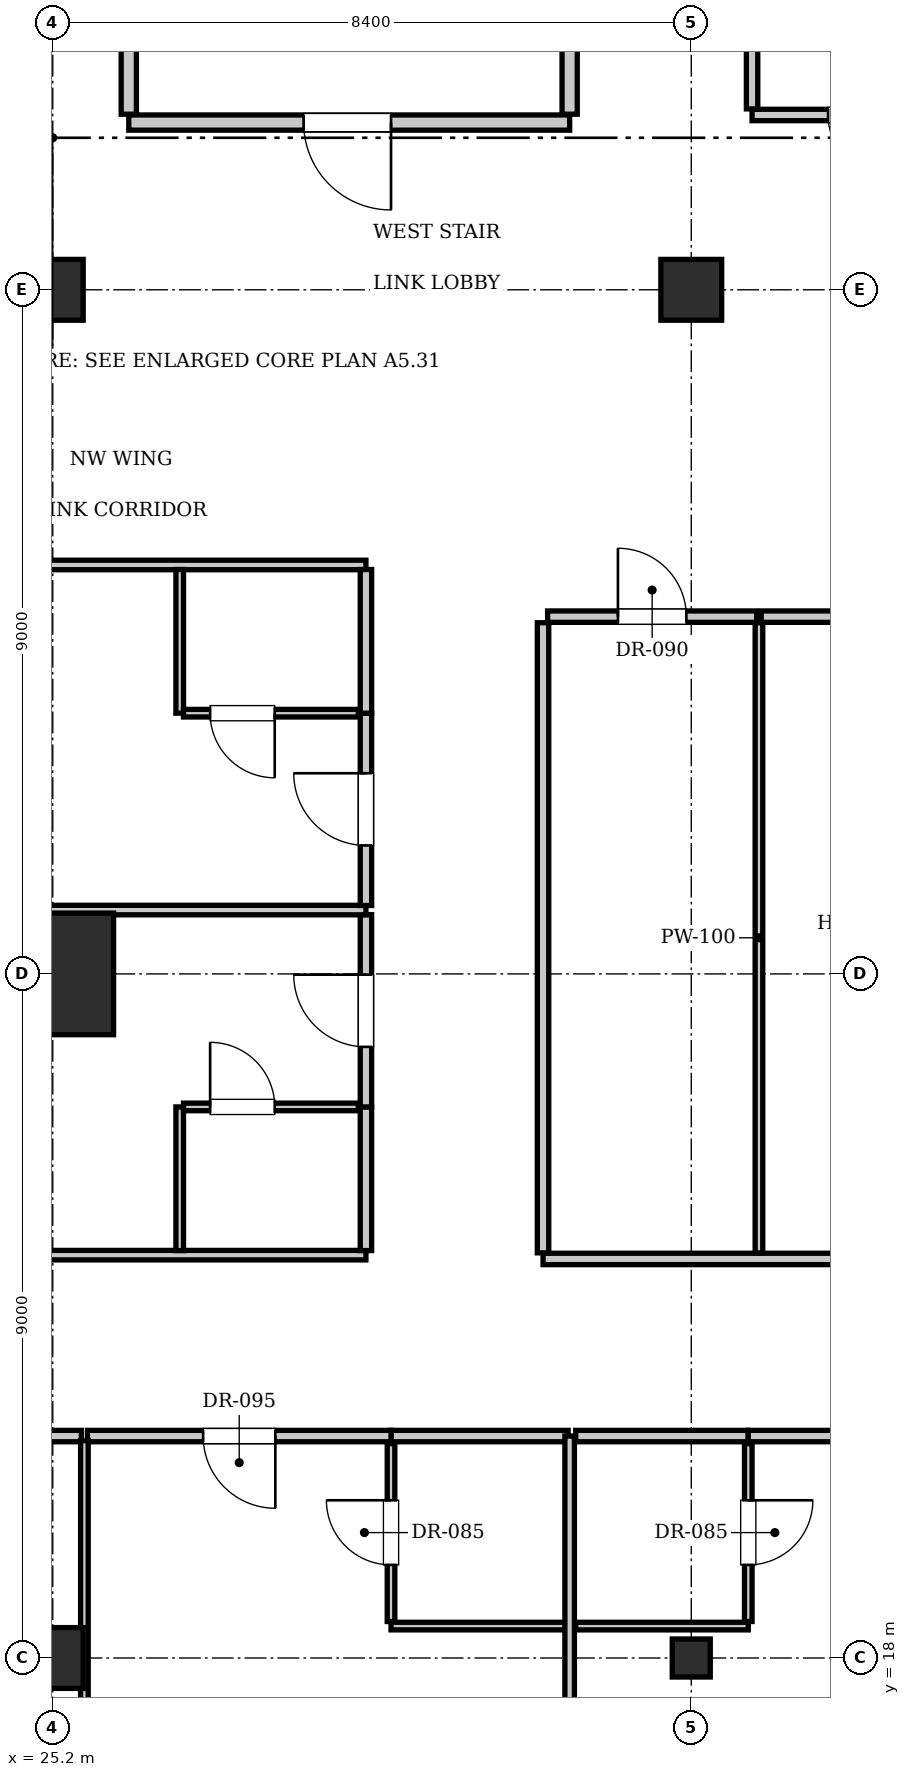
"""IFC4 building model, lengths in metres.
Left out: names, types, materials, properties, quantities, classifications, styles, units other than length and angle.
Written with IfcOpenShell. Run it as: python <this file> out.ifc"""

import sys

from ifc_helpers import new_model, si_unit, direction, frame, frame_2d, origin, origin_2d, place, context, subcontext, project, spatial, rectangle, i_section, extrude, element, fill, save


model = new_model("IFC4")
c1 = context("Model", 3, precision=1e-05, world=origin(), true_north=direction((0.0, 1.0)))
c2 = subcontext(c1, "Body", "Model", "MODEL_VIEW")
j1 = project(units=[si_unit("LENGTHUNIT", "METRE"), si_unit("PLANEANGLEUNIT", "RADIAN")], contexts=[c1])
p1 = place(None, origin())
s1 = spatial("IfcSite", under=j1, at=p1, CompositionType="ELEMENT")
p2 = place(p1, origin())
s2 = spatial("IfcBuilding", under=s1, at=p2, CompositionType="ELEMENT")
p3 = place(p2, frame((0.0, 0.0, 301.0)))
s3 = spatial("IfcBuildingStorey", under=s2, at=p3, CompositionType="ELEMENT", Elevation=301.0)
p4 = place(p3, frame((25.2, 27.0, 0.0), z_axis=(0.0, 0.0, 1.0), x_axis=(1.0, 0.0, 0.0)))
e1 = element("IfcColumn", 1, at=p4, inside=s3, PredefinedType="COLUMN", context=c2, shape_type="SweptSolid", body=[
    extrude(rectangle(XDim=1.6, YDim=1.6, at=origin_2d()), origin(), (0.0, 0.0, 1.0), 3.85),
])
for number, where, z_axis, x_axis in (
    (2, (25.2, 36.0, 0.0), (0.0, 0.0, 1.0), (1.0, 0.0, 0.0)),
    (3, (33.6, 36.0, 0.0), (0.0, 0.0, 1.0), (1.0, 0.0, 0.0)),
    (4, (25.2, 18.0, 0.0), (0.0, 0.0, 1.0), (1.0, 0.0, 0.0)),
):
    element("IfcColumn", number, at=place(p3, frame(where, z_axis=z_axis, x_axis=x_axis)), inside=s3, PredefinedType="COLUMN", context=c2, shape_type="SweptSolid", body=[
        extrude(rectangle(XDim=0.8, YDim=0.8, at=origin_2d()), origin(), (0.0, 0.0, 1.0), 3.85),
    ])
p5 = place(p3, frame((33.6, 18.0, 0.0), z_axis=(0.0, 0.0, 1.0), x_axis=(1.0, 0.0, 0.0)))
e5 = element("IfcColumn", 5, at=p5, inside=s3, PredefinedType="COLUMN", context=c2, shape_type="SweptSolid", body=[
    extrude(i_section(OverallWidth=0.5, OverallDepth=0.5, WebThickness=0.022, FlangeThickness=0.032, at=origin_2d()), origin(), (0.0, 0.0, 1.0), 3.85),
])
p6 = place(p3, frame((26.2, 38.2, 0.0), z_axis=(0.0, 0.0, 1.0), x_axis=(1.0, 0.0, 0.0)))
e6 = element("IfcWall", 6, at=p6, inside=s3, PredefinedType="PARTITIONING", context=c2, shape_type="SweptSolid", body=[
    extrude(rectangle(XDim=5.8, YDim=0.2, at=frame_2d((2.9, 0.0))), origin(), (0.0, 0.0, 1.0), 3.61),
])
p7 = place(p6, frame((2.3, 0.0, 0.0)))
e7 = element("IfcOpeningElement", 7, at=p7, cuts=e6, PredefinedType="OPENING", context=c2, shape_type="SweptSolid", body=[
    extrude(rectangle(XDim=1.15, YDim=2.15, at=frame_2d((0.575, 1.075))), frame((0.0, 0.11, 0.0), z_axis=(0.0, -1.0, 0.0), x_axis=(1.0, 0.0, 0.0)), (0.0, 0.0, 1.0), 0.22),
])
for number, where, z_axis, x_axis in (
    (8, (26.2, 38.31, 0.0), (0.0, 0.0, 1.0), (0.0, 1.0, 0.0)),
    (9, (32.0, 38.31, 0.0), (0.0, 0.0, 1.0), (0.0, 1.0, 0.0)),
):
    element("IfcWall", number, at=place(p3, frame(where, z_axis=z_axis, x_axis=x_axis)), inside=s3, PredefinedType="PARTITIONING", context=c2, shape_type="SweptSolid", body=[
        extrude(rectangle(XDim=3.07, YDim=0.2, at=frame_2d((1.535, 0.0))), origin(), (0.0, 0.0, 1.0), 3.61),
    ])
p8 = place(p3, frame((34.4, 38.3, 0.0), z_axis=(0.0, 0.0, 1.0), x_axis=(1.0, 0.0, 0.0)))
e10 = element("IfcWall", 10, at=p8, inside=s3, PredefinedType="PARTITIONING", context=c2, shape_type="SweptSolid", body=[
    extrude(rectangle(XDim=2.88, YDim=0.15, at=frame_2d((1.44, 0.0))), origin(), (0.0, 0.0, 1.0), 3.61),
])
p9 = place(p8, frame((1.0, 0.0, 0.0)))
e11 = element("IfcOpeningElement", 11, at=p9, cuts=e10, PredefinedType="OPENING", context=c2, shape_type="SweptSolid", body=[
    extrude(rectangle(XDim=0.8, YDim=2.05, at=frame_2d((0.4, 1.025))), frame((0.0, 0.085, 0.0), z_axis=(0.0, -1.0, 0.0), x_axis=(1.0, 0.0, 0.0)), (0.0, 0.0, 1.0), 0.17),
])
p10 = place(p3, frame((34.4, 38.38, 0.0), z_axis=(0.0, 0.0, 1.0), x_axis=(0.0, 1.0, 0.0)))
e12 = element("IfcWall", 12, at=p10, inside=s3, PredefinedType="PARTITIONING", context=c2, shape_type="SweptSolid", body=[
    extrude(rectangle(XDim=2.84, YDim=0.15, at=frame_2d((1.42, 0.0))), origin(), (0.0, 0.0, 1.0), 3.61),
])
p11 = place(p3, frame((31.65, 23.25, 0.0), z_axis=(0.0, 0.0, 1.0), x_axis=(1.0, 0.0, 0.0)))
e13 = element("IfcWall", 13, at=p11, inside=s3, PredefinedType="PARTITIONING", context=c2, shape_type="SweptSolid", body=[
    extrude(rectangle(XDim=12.35, YDim=0.15, at=frame_2d((6.175, 0.0))), origin(), (0.0, 0.0, 1.0), 3.61),
])
p12 = place(p3, frame((31.65, 23.33, 0.0), z_axis=(0.0, 0.0, 1.0), x_axis=(0.0, 1.0, 0.0)))
e14 = element("IfcWall", 14, at=p12, inside=s3, PredefinedType="PARTITIONING", context=c2, shape_type="SweptSolid", body=[
    extrude(rectangle(XDim=8.29, YDim=0.15, at=frame_2d((4.145, 0.0))), origin(), (0.0, 0.0, 1.0), 3.61),
])
p13 = place(p3, frame((31.71, 31.7, 0.0), z_axis=(0.0, 0.0, 1.0), x_axis=(1.0, 0.0, 0.0)))
e15 = element("IfcWall", 15, at=p13, inside=s3, PredefinedType="PARTITIONING", context=c2, shape_type="SweptSolid", body=[
    extrude(rectangle(XDim=2.75, YDim=0.15, at=frame_2d((1.375, 0.0))), origin(), (0.0, 0.0, 1.0), 3.61),
])
p14 = place(p13, frame((0.925, 0.0, 0.0)))
e16 = element("IfcOpeningElement", 16, at=p14, cuts=e15, PredefinedType="OPENING", context=c2, shape_type="SweptSolid", body=[
    extrude(rectangle(XDim=0.9, YDim=2.1, at=frame_2d((0.45, 1.05))), frame((0.0, 0.085, 0.0), z_axis=(0.0, -1.0, 0.0), x_axis=(1.0, 0.0, 0.0)), (0.0, 0.0, 1.0), 0.17),
])
p15 = place(p3, frame((34.49, 23.33, 0.0), z_axis=(0.0, 0.0, 1.0), x_axis=(0.0, 1.0, 0.0)))
e17 = element("IfcWall", 17, at=p15, inside=s3, PredefinedType="PARTITIONING", context=c2, shape_type="SweptSolid", body=[
    extrude(rectangle(XDim=8.29, YDim=0.1, at=frame_2d((4.145, 0.0))), origin(), (0.0, 0.0, 1.0), 3.61),
])
p16 = place(p3, frame((34.521, 31.7, 0.0), z_axis=(0.0, 0.0, 1.0), x_axis=(1.0, 0.0, 0.0)))
e18 = element("IfcWall", 18, at=p16, inside=s3, PredefinedType="PARTITIONING", context=c2, shape_type="SweptSolid", body=[
    extrude(rectangle(XDim=4.139, YDim=0.15, at=frame_2d((2.069, 0.0))), origin(), (0.0, 0.0, 1.0), 3.61),
])
p17 = place(p16, frame((1.619, 0.0, 0.0)))
e19 = element("IfcOpeningElement", 19, at=p17, cuts=e18, PredefinedType="OPENING", context=c2, shape_type="SweptSolid", body=[
    extrude(rectangle(XDim=0.9, YDim=2.1, at=frame_2d((0.45, 1.05))), frame((0.0, 0.085, 0.0), z_axis=(0.0, -1.0, 0.0), x_axis=(1.0, 0.0, 0.0)), (0.0, 0.0, 1.0), 0.17),
])
p18 = place(p3, frame((29.65, 20.92, 0.0), z_axis=(0.0, 0.0, 1.0), x_axis=(1.0, 0.0, 0.0)))
e20 = element("IfcWall", 20, at=p18, inside=s3, PredefinedType="PARTITIONING", context=c2, shape_type="SweptSolid", body=[
    extrude(rectangle(XDim=2.33, YDim=0.15, at=frame_2d((1.165, 0.0))), origin(), (0.0, 0.0, 1.0), 3.61),
])
p19 = place(p3, frame((29.65, 18.42, 0.0), z_axis=(0.0, 0.0, 1.0), x_axis=(1.0, 0.0, 0.0)))
e21 = element("IfcWall", 21, at=p19, inside=s3, PredefinedType="PARTITIONING", context=c2, shape_type="SweptSolid", body=[
    extrude(rectangle(XDim=2.31, YDim=0.1, at=frame_2d((1.155, 0.0))), origin(), (0.0, 0.0, 1.0), 3.61),
])
p20 = place(p3, frame((29.65, 18.48, 0.0), z_axis=(0.0, 0.0, 1.0), x_axis=(0.0, 1.0, 0.0)))
e22 = element("IfcWall", 22, at=p20, inside=s3, PredefinedType="PARTITIONING", context=c2, shape_type="SweptSolid", body=[
    extrude(rectangle(XDim=2.34, YDim=0.1, at=frame_2d((1.17, 0.0))), origin(), (0.0, 0.0, 1.0), 3.61),
])
p21 = place(p20, frame((0.745, 0.0, 0.0)))
e23 = element("IfcOpeningElement", 23, at=p21, cuts=e22, PredefinedType="OPENING", context=c2, shape_type="SweptSolid", body=[
    extrude(rectangle(XDim=0.85, YDim=2.1, at=frame_2d((0.425, 1.05))), frame((0.0, 0.06, 0.0), z_axis=(0.0, -1.0, 0.0), x_axis=(1.0, 0.0, 0.0)), (0.0, 0.0, 1.0), 0.12),
])
p22 = place(p3, frame((20.62, 20.92, 0.0), z_axis=(0.0, 0.0, 1.0), x_axis=(1.0, 0.0, 0.0)))
e24 = element("IfcWall", 24, at=p22, inside=s3, PredefinedType="PARTITIONING", context=c2, shape_type="SweptSolid", body=[
    extrude(rectangle(XDim=4.956, YDim=0.15, at=frame_2d((2.478, 0.0))), origin(), (0.0, 0.0, 1.0), 3.61),
])
p23 = place(p3, frame((25.656, 20.92, 0.0), z_axis=(0.0, 0.0, 1.0), x_axis=(1.0, 0.0, 0.0)))
e25 = element("IfcWall", 25, at=p23, inside=s3, PredefinedType="PARTITIONING", context=c2, shape_type="SweptSolid", body=[
    extrude(rectangle(XDim=3.994, YDim=0.15, at=frame_2d((1.997, 0.0))), origin(), (0.0, 0.0, 1.0), 3.61),
])
p24 = place(p23, frame((1.522, 0.0, 0.0)))
e26 = element("IfcOpeningElement", 26, at=p24, cuts=e25, PredefinedType="OPENING", context=c2, shape_type="SweptSolid", body=[
    extrude(rectangle(XDim=0.95, YDim=2.15, at=frame_2d((0.475, 1.075))), frame((0.0, 0.085, 0.0), z_axis=(0.0, -1.0, 0.0), x_axis=(1.0, 0.0, 0.0)), (0.0, 0.0, 1.0), 0.17),
])
p25 = place(p3, frame((25.616, 9.23, 0.0), z_axis=(0.0, 0.0, 1.0), x_axis=(0.0, 1.0, 0.0)))
e27 = element("IfcWall", 27, at=p25, inside=s3, PredefinedType="PARTITIONING", context=c2, shape_type="SweptSolid", body=[
    extrude(rectangle(XDim=11.63, YDim=0.1, at=frame_2d((5.815, 0.0))), origin(), (0.0, 0.0, 1.0), 3.61),
])
p26 = place(p25, frame((1.6, 0.0, 0.0)))
e28 = element("IfcOpeningElement", 28, at=p26, cuts=e27, PredefinedType="OPENING", context=c2, shape_type="SweptSolid", body=[
    extrude(rectangle(XDim=0.9, YDim=2.1, at=frame_2d((0.45, 1.05))), frame((0.0, 0.06, 0.0), z_axis=(0.0, -1.0, 0.0), x_axis=(1.0, 0.0, 0.0)), (0.0, 0.0, 1.0), 0.12),
])
p27 = place(p3, frame((32.0, 9.3, 0.0), z_axis=(0.0, 0.0, 1.0), x_axis=(0.0, 1.0, 0.0)))
e29 = element("IfcWall", 29, at=p27, inside=s3, PredefinedType="PARTITIONING", context=c2, shape_type="SweptSolid", body=[
    extrude(rectangle(XDim=11.62, YDim=0.125, at=frame_2d((5.81, 0.0))), origin(), (0.0, 0.0, 1.0), 3.61),
])
p28 = place(p3, frame((32.08, 20.92, 0.0), z_axis=(0.0, 0.0, 1.0), x_axis=(1.0, 0.0, 0.0)))
e30 = element("IfcWall", 30, at=p28, inside=s3, PredefinedType="PARTITIONING", context=c2, shape_type="SweptSolid", body=[
    extrude(rectangle(XDim=2.27, YDim=0.15, at=frame_2d((1.135, 0.0))), origin(), (0.0, 0.0, 1.0), 3.61),
])
p29 = place(p3, frame((32.08, 18.42, 0.0), z_axis=(0.0, 0.0, 1.0), x_axis=(1.0, 0.0, 0.0)))
e31 = element("IfcWall", 31, at=p29, inside=s3, PredefinedType="PARTITIONING", context=c2, shape_type="SweptSolid", body=[
    extrude(rectangle(XDim=2.27, YDim=0.1, at=frame_2d((1.135, 0.0))), origin(), (0.0, 0.0, 1.0), 3.61),
])
p30 = place(p3, frame((34.35, 18.48, 0.0), z_axis=(0.0, 0.0, 1.0), x_axis=(0.0, 1.0, 0.0)))
e32 = element("IfcWall", 32, at=p30, inside=s3, PredefinedType="PARTITIONING", context=c2, shape_type="SweptSolid", body=[
    extrude(rectangle(XDim=2.34, YDim=0.1, at=frame_2d((1.17, 0.0))), origin(), (0.0, 0.0, 1.0), 3.61),
])
p31 = place(p30, frame((0.745, 0.0, 0.0)))
e33 = element("IfcOpeningElement", 33, at=p31, cuts=e32, PredefinedType="OPENING", context=c2, shape_type="SweptSolid", body=[
    extrude(rectangle(XDim=0.85, YDim=2.1, at=frame_2d((0.425, 1.05))), frame((0.0, 0.06, 0.0), z_axis=(0.0, -1.0, 0.0), x_axis=(1.0, 0.0, 0.0)), (0.0, 0.0, 1.0), 0.12),
])
p32 = place(p3, frame((34.35, 20.92, 0.0), z_axis=(0.0, 0.0, 1.0), x_axis=(1.0, 0.0, 0.0)))
e34 = element("IfcWall", 34, at=p32, inside=s3, PredefinedType="PARTITIONING", context=c2, shape_type="SweptSolid", body=[
    extrude(rectangle(XDim=4.106, YDim=0.15, at=frame_2d((2.053, 0.0))), origin(), (0.0, 0.0, 1.0), 3.61),
])
p33 = place(p32, frame((1.578, 0.0, 0.0)))
e35 = element("IfcOpeningElement", 35, at=p33, cuts=e34, PredefinedType="OPENING", context=c2, shape_type="SweptSolid", body=[
    extrude(rectangle(XDim=0.95, YDim=2.15, at=frame_2d((0.475, 1.075))), frame((0.0, 0.085, 0.0), z_axis=(0.0, -1.0, 0.0), x_axis=(1.0, 0.0, 0.0)), (0.0, 0.0, 1.0), 0.17),
])
for number, where, z_axis, x_axis in (
    (36, (15.5, 23.3, 0.0), (0.0, 0.0, 1.0), (1.0, 0.0, 0.0)),
    (37, (15.5, 32.38, 0.0), (0.0, 0.0, 1.0), (1.0, 0.0, 0.0)),
):
    element("IfcWall", number, at=place(p3, frame(where, z_axis=z_axis, x_axis=x_axis)), inside=s3, PredefinedType="PARTITIONING", context=c2, shape_type="SweptSolid", body=[
        extrude(rectangle(XDim=13.82, YDim=0.125, at=frame_2d((6.91, 0.0))), origin(), (0.0, 0.0, 1.0), 3.61),
    ])
p34 = place(p3, frame((29.32, 23.36, 0.0), z_axis=(0.0, 0.0, 1.0), x_axis=(0.0, 1.0, 0.0)))
e38 = element("IfcWall", 38, at=p34, inside=s3, PredefinedType="PARTITIONING", context=c2, shape_type="SweptSolid", body=[
    extrude(rectangle(XDim=1.89, YDim=0.15, at=frame_2d((0.945, 0.0))), origin(), (0.0, 0.0, 1.0), 3.61),
])
p35 = place(p3, frame((29.32, 25.25, 0.0), z_axis=(0.0, 0.0, 1.0), x_axis=(0.0, 1.0, 0.0)))
e39 = element("IfcWall", 39, at=p35, inside=s3, PredefinedType="PARTITIONING", context=c2, shape_type="SweptSolid", body=[
    extrude(rectangle(XDim=2.53, YDim=0.15, at=frame_2d((1.265, 0.0))), origin(), (0.0, 0.0, 1.0), 3.61),
])
p36 = place(p35, frame((0.79, 0.0, 0.0)))
e40 = element("IfcOpeningElement", 40, at=p36, cuts=e39, PredefinedType="OPENING", context=c2, shape_type="SweptSolid", body=[
    extrude(rectangle(XDim=0.95, YDim=2.15, at=frame_2d((0.475, 1.075))), frame((0.0, 0.085, 0.0), z_axis=(0.0, -1.0, 0.0), x_axis=(1.0, 0.0, 0.0)), (0.0, 0.0, 1.0), 0.17),
])
p37 = place(p3, frame((26.87, 23.36, 0.0), z_axis=(0.0, 0.0, 1.0), x_axis=(0.0, 1.0, 0.0)))
e41 = element("IfcWall", 41, at=p37, inside=s3, PredefinedType="PARTITIONING", context=c2, shape_type="SweptSolid", body=[
    extrude(rectangle(XDim=1.89, YDim=0.1, at=frame_2d((0.945, 0.0))), origin(), (0.0, 0.0, 1.0), 3.61),
])
p38 = place(p3, frame((26.92, 25.25, 0.0), z_axis=(0.0, 0.0, 1.0), x_axis=(1.0, 0.0, 0.0)))
e42 = element("IfcWall", 42, at=p38, inside=s3, PredefinedType="PARTITIONING", context=c2, shape_type="SweptSolid", body=[
    extrude(rectangle(XDim=2.3, YDim=0.1, at=frame_2d((1.15, 0.0))), origin(), (0.0, 0.0, 1.0), 3.61),
])
p39 = place(p38, frame((0.35, 0.0, 0.0)))
e43 = element("IfcOpeningElement", 43, at=p39, cuts=e42, PredefinedType="OPENING", context=c2, shape_type="SweptSolid", body=[
    extrude(rectangle(XDim=0.85, YDim=2.1, at=frame_2d((0.425, 1.05))), frame((0.0, 0.06, 0.0), z_axis=(0.0, -1.0, 0.0), x_axis=(1.0, 0.0, 0.0)), (0.0, 0.0, 1.0), 0.12),
])
p40 = place(p3, frame((15.5, 27.84, 0.0), z_axis=(0.0, 0.0, 1.0), x_axis=(1.0, 0.0, 0.0)))
e44 = element("IfcWall", 44, at=p40, inside=s3, PredefinedType="PARTITIONING", context=c2, shape_type="SweptSolid", body=[
    extrude(rectangle(XDim=13.82, YDim=0.125, at=frame_2d((6.91, 0.0))), origin(), (0.0, 0.0, 1.0), 3.61),
])
p41 = place(p3, frame((29.32, 27.9, 0.0), z_axis=(0.0, 0.0, 1.0), x_axis=(0.0, 1.0, 0.0)))
e45 = element("IfcWall", 45, at=p41, inside=s3, PredefinedType="PARTITIONING", context=c2, shape_type="SweptSolid", body=[
    extrude(rectangle(XDim=2.53, YDim=0.15, at=frame_2d((1.265, 0.0))), origin(), (0.0, 0.0, 1.0), 3.61),
])
p42 = place(p41, frame((0.79, 0.0, 0.0)))
e46 = element("IfcOpeningElement", 46, at=p42, cuts=e45, PredefinedType="OPENING", context=c2, shape_type="SweptSolid", body=[
    extrude(rectangle(XDim=0.95, YDim=2.15, at=frame_2d((0.475, 1.075))), frame((0.0, 0.085, 0.0), z_axis=(0.0, -1.0, 0.0), x_axis=(1.0, 0.0, 0.0)), (0.0, 0.0, 1.0), 0.17),
])
p43 = place(p3, frame((29.32, 30.43, 0.0), z_axis=(0.0, 0.0, 1.0), x_axis=(0.0, 1.0, 0.0)))
e47 = element("IfcWall", 47, at=p43, inside=s3, PredefinedType="PARTITIONING", context=c2, shape_type="SweptSolid", body=[
    extrude(rectangle(XDim=1.89, YDim=0.15, at=frame_2d((0.945, 0.0))), origin(), (0.0, 0.0, 1.0), 3.61),
])
p44 = place(p3, frame((26.87, 30.43, 0.0), z_axis=(0.0, 0.0, 1.0), x_axis=(0.0, 1.0, 0.0)))
e48 = element("IfcWall", 48, at=p44, inside=s3, PredefinedType="PARTITIONING", context=c2, shape_type="SweptSolid", body=[
    extrude(rectangle(XDim=1.89, YDim=0.1, at=frame_2d((0.945, 0.0))), origin(), (0.0, 0.0, 1.0), 3.61),
])
p45 = place(p3, frame((26.92, 30.43, 0.0), z_axis=(0.0, 0.0, 1.0), x_axis=(1.0, 0.0, 0.0)))
e49 = element("IfcWall", 49, at=p45, inside=s3, PredefinedType="PARTITIONING", context=c2, shape_type="SweptSolid", body=[
    extrude(rectangle(XDim=2.3, YDim=0.1, at=frame_2d((1.15, 0.0))), origin(), (0.0, 0.0, 1.0), 3.61),
])
p46 = place(p45, frame((0.35, 0.0, 0.0)))
e50 = element("IfcOpeningElement", 50, at=p46, cuts=e49, PredefinedType="OPENING", context=c2, shape_type="SweptSolid", body=[
    extrude(rectangle(XDim=0.85, YDim=2.1, at=frame_2d((0.425, 1.05))), frame((0.0, 0.06, 0.0), z_axis=(0.0, -1.0, 0.0), x_axis=(1.0, 0.0, 0.0)), (0.0, 0.0, 1.0), 0.12),
])
p47 = place(p7, frame((1.15, 0.0, 0.0), z_axis=(0.0, 0.0, 1.0), x_axis=(-1.0, 0.0, 0.0)))
e51 = element("IfcDoor", 51, at=p47, inside=s3, OperationType="SINGLE_SWING_LEFT", PredefinedType="DOOR", context=c2, shape_type="SweptSolid", body=[
    extrude(rectangle(XDim=1.15, YDim=2.15, at=frame_2d((0.575, 1.075))), frame((0.0, 0.025, 0.0), z_axis=(0.0, -1.0, 0.0), x_axis=(1.0, 0.0, 0.0)), (0.0, 0.0, 1.0), 0.05),
])
fill(e7, e51)
p48 = place(p9, frame((0.8, 0.0, 0.0), z_axis=(0.0, 0.0, 1.0), x_axis=(-1.0, 0.0, 0.0)))
e52 = element("IfcDoor", 52, at=p48, inside=s3, OperationType="SINGLE_SWING_LEFT", PredefinedType="DOOR", context=c2, shape_type="SweptSolid", body=[
    extrude(rectangle(XDim=0.8, YDim=2.05, at=frame_2d((0.4, 1.025))), frame((0.0, 0.025, 0.0), z_axis=(0.0, -1.0, 0.0), x_axis=(1.0, 0.0, 0.0)), (0.0, 0.0, 1.0), 0.05),
])
fill(e11, e52)
p49 = place(p14, origin())
e53 = element("IfcDoor", 53, at=p49, inside=s3, OperationType="SINGLE_SWING_LEFT", PredefinedType="DOOR", context=c2, shape_type="SweptSolid", body=[
    extrude(rectangle(XDim=0.9, YDim=2.1, at=frame_2d((0.45, 1.05))), frame((0.0, 0.025, 0.0), z_axis=(0.0, -1.0, 0.0), x_axis=(1.0, 0.0, 0.0)), (0.0, 0.0, 1.0), 0.05),
])
fill(e16, e53)
p50 = place(p21, origin())
e54 = element("IfcDoor", 54, at=p50, inside=s3, OperationType="SINGLE_SWING_RIGHT", PredefinedType="DOOR", context=c2, shape_type="SweptSolid", body=[
    extrude(rectangle(XDim=0.85, YDim=2.1, at=frame_2d((0.425, 1.05))), frame((0.0, 0.025, 0.0), z_axis=(0.0, -1.0, 0.0), x_axis=(1.0, 0.0, 0.0)), (0.0, 0.0, 1.0), 0.05),
])
fill(e23, e54)
p51 = place(p24, frame((0.95, 0.0, 0.0), z_axis=(0.0, 0.0, 1.0), x_axis=(-1.0, 0.0, 0.0)))
e55 = element("IfcDoor", 55, at=p51, inside=s3, OperationType="SINGLE_SWING_LEFT", PredefinedType="DOOR", context=c2, shape_type="SweptSolid", body=[
    extrude(rectangle(XDim=0.95, YDim=2.15, at=frame_2d((0.475, 1.075))), frame((0.0, 0.025, 0.0), z_axis=(0.0, -1.0, 0.0), x_axis=(1.0, 0.0, 0.0)), (0.0, 0.0, 1.0), 0.05),
])
fill(e26, e55)
p52 = place(p31, frame((0.85, 0.0, 0.0), z_axis=(0.0, 0.0, 1.0), x_axis=(-1.0, 0.0, 0.0)))
e56 = element("IfcDoor", 56, at=p52, inside=s3, OperationType="SINGLE_SWING_LEFT", PredefinedType="DOOR", context=c2, shape_type="SweptSolid", body=[
    extrude(rectangle(XDim=0.85, YDim=2.1, at=frame_2d((0.425, 1.05))), frame((0.0, 0.025, 0.0), z_axis=(0.0, -1.0, 0.0), x_axis=(1.0, 0.0, 0.0)), (0.0, 0.0, 1.0), 0.05),
])
fill(e33, e56)
p53 = place(p39, origin())
e57 = element("IfcDoor", 57, at=p53, inside=s3, OperationType="SINGLE_SWING_LEFT", PredefinedType="DOOR", context=c2, shape_type="SweptSolid", body=[
    extrude(rectangle(XDim=0.85, YDim=2.1, at=frame_2d((0.425, 1.05))), frame((0.0, 0.025, 0.0), z_axis=(0.0, -1.0, 0.0), x_axis=(1.0, 0.0, 0.0)), (0.0, 0.0, 1.0), 0.05),
])
fill(e43, e57)
p54 = place(p36, origin())
e58 = element("IfcDoor", 58, at=p54, inside=s3, OperationType="SINGLE_SWING_RIGHT", PredefinedType="DOOR", context=c2, shape_type="SweptSolid", body=[
    extrude(rectangle(XDim=0.95, YDim=2.15, at=frame_2d((0.475, 1.075))), frame((0.0, 0.025, 0.0), z_axis=(0.0, -1.0, 0.0), x_axis=(1.0, 0.0, 0.0)), (0.0, 0.0, 1.0), 0.05),
])
fill(e40, e58)
p55 = place(p46, frame((0.85, 0.0, 0.0), z_axis=(0.0, 0.0, 1.0), x_axis=(-1.0, 0.0, 0.0)))
e59 = element("IfcDoor", 59, at=p55, inside=s3, OperationType="SINGLE_SWING_LEFT", PredefinedType="DOOR", context=c2, shape_type="SweptSolid", body=[
    extrude(rectangle(XDim=0.85, YDim=2.1, at=frame_2d((0.425, 1.05))), frame((0.0, 0.025, 0.0), z_axis=(0.0, -1.0, 0.0), x_axis=(1.0, 0.0, 0.0)), (0.0, 0.0, 1.0), 0.05),
])
fill(e50, e59)
p56 = place(p42, origin())
e60 = element("IfcDoor", 60, at=p56, inside=s3, OperationType="SINGLE_SWING_RIGHT", PredefinedType="DOOR", context=c2, shape_type="SweptSolid", body=[
    extrude(rectangle(XDim=0.95, YDim=2.15, at=frame_2d((0.475, 1.075))), frame((0.0, 0.025, 0.0), z_axis=(0.0, -1.0, 0.0), x_axis=(1.0, 0.0, 0.0)), (0.0, 0.0, 1.0), 0.05),
])
fill(e46, e60)
save(model, sys.argv[1])
